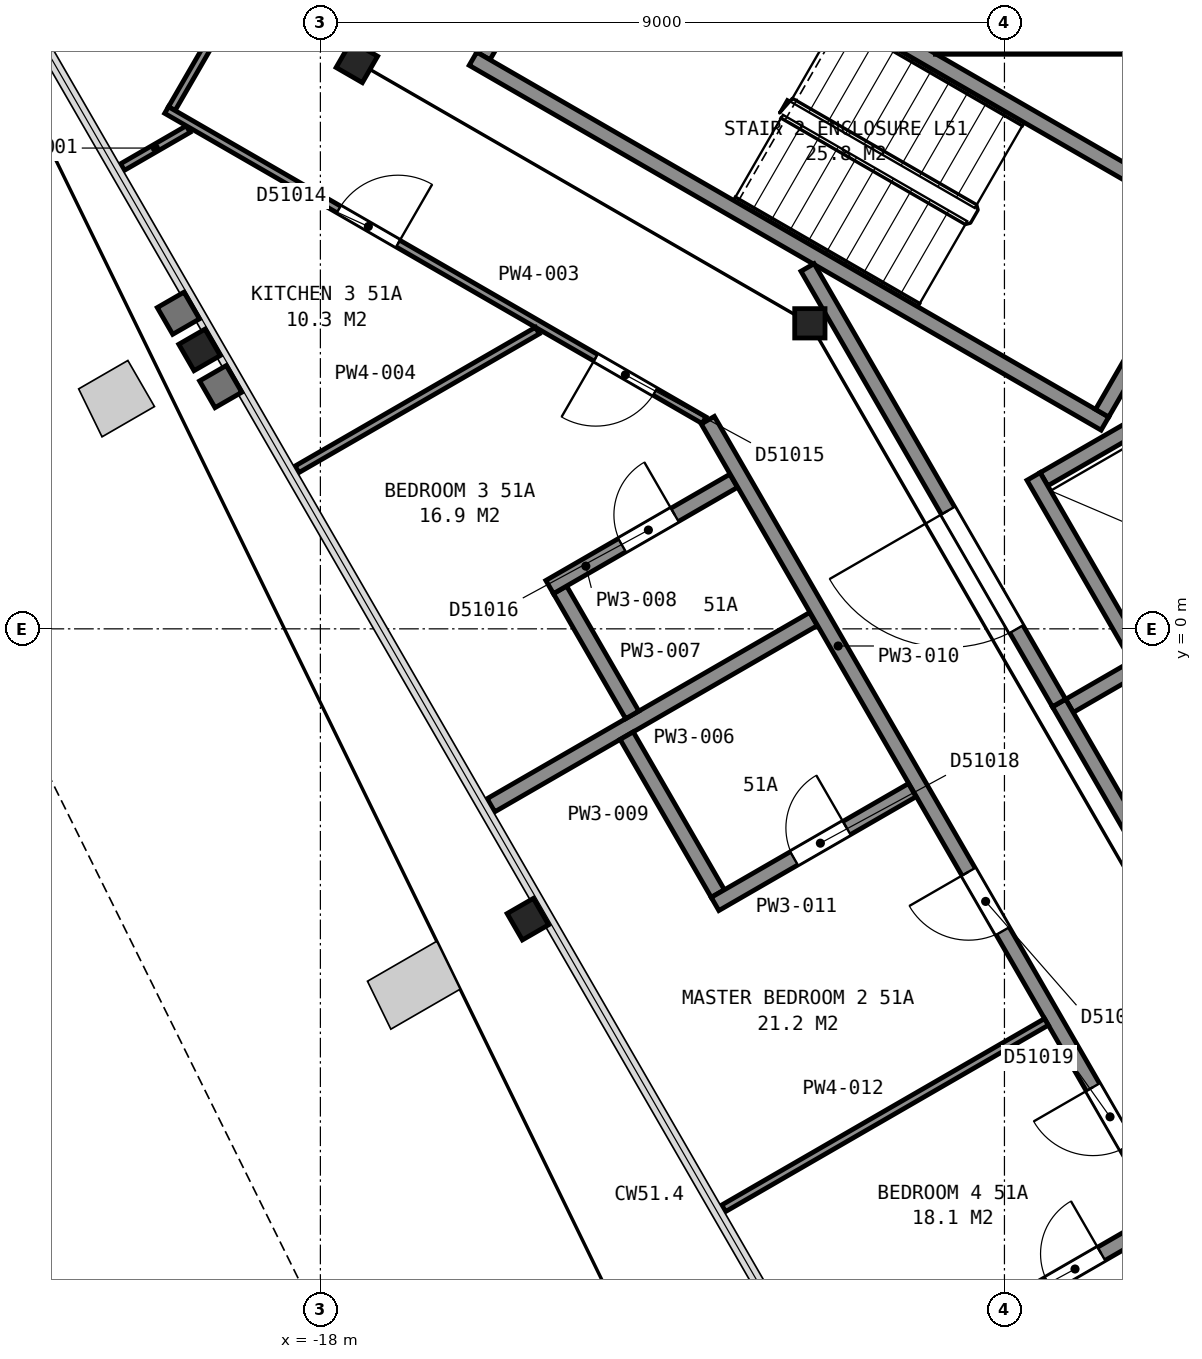
"""IFC4 building model, lengths in metres.
Left out: names, types, materials, properties, quantities, classifications, styles, units other than length and angle.
Written with IfcOpenShell. Run it as: python <this file> out.ifc"""

import sys

from ifc_helpers import new_model, si_unit, direction, frame, frame_2d, origin, origin_2d, place, context, subcontext, project, spatial, rectangle, i_section, extrude, element, fill, save


model = new_model("IFC4")
c1 = context("Model", 3, precision=1e-05, world=origin(), true_north=direction((0.0, 1.0)))
c2 = subcontext(c1, "Body", "Model", "MODEL_VIEW")
j1 = project(units=[si_unit("LENGTHUNIT", "METRE"), si_unit("PLANEANGLEUNIT", "RADIAN")], contexts=[c1])
p1 = place(None, origin())
s1 = spatial("IfcSite", under=j1, at=p1, CompositionType="ELEMENT")
p2 = place(p1, origin())
s2 = spatial("IfcBuilding", under=s1, at=p2, CompositionType="ELEMENT")
p3 = place(p2, frame((0.0, 0.0, 206.4)))
s3 = spatial("IfcBuildingStorey", under=s2, at=p3, CompositionType="ELEMENT", Elevation=206.4)
for number, where, z_axis, x_axis in (
    (1, (-19.59, 3.67, 0.0), (0.0, 0.0, 1.0), (-0.5, 0.866, 0.0)),
    (2, (-15.27, -3.82, 0.0), (0.0, 0.0, 1.0), (-0.5, 0.866, 0.0)),
    (3, (-17.52, 7.46, 0.0), (0.0, 0.0, 1.0), (0.5, 0.866, 0.0)),
):
    element("IfcColumn", number, at=place(p3, frame(where, z_axis=z_axis, x_axis=x_axis)), inside=s3, PredefinedType="COLUMN", context=c2, shape_type="SweptSolid", body=[
        extrude(i_section(OverallWidth=0.401, OverallDepth=0.399, WebThickness=0.025, FlangeThickness=0.04, FilletRadius=0.015, at=origin_2d()), origin(), (0.0, 0.0, 1.0), 3.7),
    ])
p4 = place(p3, frame((-11.56, 4.02, 0.0), z_axis=(0.0, 0.0, 1.0), x_axis=(1.0, 0.0, 0.0)))
e4 = element("IfcColumn", 4, at=p4, inside=s3, PredefinedType="COLUMN", context=c2, shape_type="SweptSolid", body=[
    extrude(i_section(OverallWidth=0.399, OverallDepth=0.386, WebThickness=0.021, FlangeThickness=0.033, FilletRadius=0.015, at=origin_2d()), origin(), (0.0, 0.0, 1.0), 3.7),
])
p5 = place(p3, frame((-14.455, 9.962, 0.0), z_axis=(0.0, 0.0, 1.0), x_axis=(-0.500049511043, -0.865996816683, 0.0)))
e5 = element("IfcWall", 5, at=p5, inside=s3, PredefinedType="PARTITIONING", context=c2, shape_type="SweptSolid", body=[
    extrude(rectangle(XDim=2.8, YDim=0.2, at=frame_2d((1.4, 0.0))), origin(), (0.0, 0.0, 1.0), 3.45),
])
p6 = place(p5, frame((0.85, 0.0, 0.0)))
e6 = element("IfcOpeningElement", 6, at=p6, cuts=e5, PredefinedType="OPENING", context=c2, shape_type="SweptSolid", body=[
    extrude(rectangle(XDim=1.1, YDim=2.1, at=frame_2d((0.55, 1.05))), frame((0.0, 0.11, 0.0), z_axis=(0.0, -1.0, 0.0), x_axis=(1.0, 0.0, 0.0)), (0.0, 0.0, 1.0), 0.22),
])
for number, where, z_axis, x_axis in (
    (7, (-7.678, 2.701, 0.0), (0.0, 0.0, 1.0), (-0.866, 0.5, 0.0)),
    (8, (-6.178, 5.299, 0.0), (0.0, 0.0, 1.0), (-0.866, 0.5, 0.0)),
):
    element("IfcWall", number, at=place(p3, frame(where, z_axis=z_axis, x_axis=x_axis)), inside=s3, PredefinedType="PARTITIONING", context=c2, shape_type="SweptSolid", body=[
        extrude(rectangle(XDim=9.6, YDim=0.2, at=frame_2d((4.8, 0.0))), origin(), (0.0, 0.0, 1.0), 3.45),
    ])
p7 = place(p3, frame((-6.315, 5.262, 0.0), z_axis=(0.0, 0.0, 1.0), x_axis=(-0.500049511043, -0.865996816683, 0.0)))
e9 = element("IfcWall", 9, at=p7, inside=s3, PredefinedType="PARTITIONING", context=c2, shape_type="SweptSolid", body=[
    extrude(rectangle(XDim=2.8, YDim=0.2, at=frame_2d((1.4, 0.0))), origin(), (0.0, 0.0, 1.0), 3.45),
])
p8 = place(p3, frame((-8.145, -1.013, 0.0), z_axis=(0.0, 0.0, 1.0), x_axis=(0.866016494683, 0.500015430699, 0.0)))
e10 = element("IfcWall", 10, at=p8, inside=s3, PredefinedType="PARTITIONING", context=c2, shape_type="SweptSolid", body=[
    extrude(rectangle(XDim=3.15, YDim=0.2, at=frame_2d((1.575, 0.0))), origin(), (0.0, 0.0, 1.0), 3.7),
])
p9 = place(p3, frame((-8.48, 1.969, 0.0), z_axis=(0.0, 0.0, 1.0), x_axis=(0.866000020948, 0.500043961785, 0.0)))
e11 = element("IfcWall", 11, at=p9, inside=s3, PredefinedType="PARTITIONING", context=c2, shape_type="SweptSolid", body=[
    extrude(rectangle(XDim=1.95, YDim=0.2, at=frame_2d((0.975, 0.0))), origin(), (0.0, 0.0, 1.0), 3.7),
])
p10 = place(p3, frame((-7.242, -0.376, 0.0), z_axis=(0.0, 0.0, 1.0), x_axis=(-0.499996545922, 0.866027397988, 0.0)))
e12 = element("IfcWall", 12, at=p10, inside=s3, PredefinedType="PARTITIONING", context=c2, shape_type="SweptSolid", body=[
    extrude(rectangle(XDim=2.75, YDim=0.2, at=frame_2d((1.375, 0.0))), origin(), (0.0, 0.0, 1.0), 3.7),
])
p11 = place(p3, frame((-7.006, -3.185, 0.0), z_axis=(0.0, 0.0, 1.0), x_axis=(-0.499990435942, 0.866030925526, 0.0)))
e13 = element("IfcWall", 13, at=p11, inside=s3, PredefinedType="PARTITIONING", context=c2, shape_type="SweptSolid", body=[
    extrude(rectangle(XDim=2.55, YDim=0.2, at=frame_2d((1.275, 0.0))), origin(), (0.0, 0.0, 1.0), 3.7),
])
p12 = place(p3, frame((-11.591, 4.755, 0.0), z_axis=(0.0, 0.0, 1.0), x_axis=(0.500043977787, -0.866000011708, 0.0)))
e14 = element("IfcWall", 14, at=p12, inside=s3, PredefinedType="PARTITIONING", context=c2, shape_type="SweptSolid", body=[
    extrude(rectangle(XDim=6.617, YDim=0.2, at=frame_2d((3.308, 0.0))), origin(), (0.0, 0.0, 1.0), 3.45),
])
p13 = place(p12, frame((3.695, 0.0, 0.0)))
e15 = element("IfcOpeningElement", 15, at=p13, cuts=e14, PredefinedType="OPENING", context=c2, shape_type="SweptSolid", body=[
    extrude(rectangle(XDim=1.8, YDim=2.1, at=frame_2d((0.9, 1.05))), frame((0.0, 0.11, 0.0), z_axis=(0.0, -1.0, 0.0), x_axis=(1.0, 0.0, 0.0)), (0.0, 0.0, 1.0), 0.22),
])
p14 = place(p3, frame((-9.908, 7.66, 0.0), z_axis=(0.0, 0.0, 1.0), x_axis=(1.0, 0.0, 0.0)))
e16 = element("IfcWall", 16, at=p14, inside=s3, PredefinedType="PARTITIONING", context=c2, shape_type="SweptSolid", body=[
    extrude(rectangle(XDim=3.621, YDim=0.2, at=frame_2d((1.811, 0.0))), origin(), (0.0, 0.0, 1.0), 3.45),
])
p15 = place(p3, frame((-20.604, 6.076, 0.0), z_axis=(0.0, 0.0, 1.0), x_axis=(0.865855657918, 0.500293893279, 0.0)))
e17 = element("IfcWall", 17, at=p15, inside=s3, PredefinedType="PARTITIONING", context=c2, shape_type="SweptSolid", body=[
    extrude(rectangle(XDim=0.999, YDim=0.1, at=frame_2d((0.499, 0.0))), origin(), (0.0, 0.0, 1.0), 2.713),
])
p16 = place(p3, frame((-19.955, 6.844, 0.0), z_axis=(0.0, 0.0, 1.0), x_axis=(0.500415732313, 0.865785247537, 0.0)))
e18 = element("IfcWall", 18, at=p16, inside=s3, PredefinedType="PARTITIONING", context=c2, shape_type="SweptSolid", body=[
    extrude(rectangle(XDim=8.097, YDim=0.1, at=frame_2d((4.049, 0.0))), origin(), (0.0, 0.0, 1.0), 2.713),
])
p17 = place(p16, frame((3.6, 0.0, 0.0)))
e19 = element("IfcOpeningElement", 19, at=p17, cuts=e18, PredefinedType="OPENING", context=c2, shape_type="SweptSolid", body=[
    extrude(rectangle(XDim=0.9, YDim=2.1, at=frame_2d((0.45, 1.05))), frame((0.0, 0.06, 0.0), z_axis=(0.0, -1.0, 0.0), x_axis=(1.0, 0.0, 0.0)), (0.0, 0.0, 1.0), 0.12),
])
p18 = place(p3, frame((-12.952, 2.744, 0.0), z_axis=(0.0, 0.0, 1.0), x_axis=(-0.86608949446, 0.499888975259, 0.0)))
e20 = element("IfcWall", 20, at=p18, inside=s3, PredefinedType="PARTITIONING", context=c2, shape_type="SweptSolid", body=[
    extrude(rectangle(XDim=8.165, YDim=0.1, at=frame_2d((4.083, 0.0))), origin(), (0.0, 0.0, 1.0), 2.713),
])
p19 = place(p18, frame((4.65, 0.0, 0.0)))
e21 = element("IfcOpeningElement", 21, at=p19, cuts=e20, PredefinedType="OPENING", context=c2, shape_type="SweptSolid", body=[
    extrude(rectangle(XDim=0.9, YDim=2.1, at=frame_2d((0.45, 1.05))), frame((0.0, 0.06, 0.0), z_axis=(0.0, -1.0, 0.0), x_axis=(1.0, 0.0, 0.0)), (0.0, 0.0, 1.0), 0.12),
])
p20 = place(p18, frame((0.746, 0.0, 0.0)))
e22 = element("IfcOpeningElement", 22, at=p20, cuts=e20, PredefinedType="OPENING", context=c2, shape_type="SweptSolid", body=[
    extrude(rectangle(XDim=0.9, YDim=2.1, at=frame_2d((0.45, 1.05))), frame((0.0, 0.06, 0.0), z_axis=(0.0, -1.0, 0.0), x_axis=(1.0, 0.0, 0.0)), (0.0, 0.0, 1.0), 0.12),
])
p21 = place(p3, frame((-18.308, 2.099, 0.0), z_axis=(0.0, 0.0, 1.0), x_axis=(0.866054218355, 0.499950088379, 0.0)))
e23 = element("IfcWall", 23, at=p21, inside=s3, PredefinedType="PARTITIONING", context=c2, shape_type="SweptSolid", body=[
    extrude(rectangle(XDim=3.652, YDim=0.1, at=frame_2d((1.826, 0.0))), origin(), (0.0, 0.0, 1.0), 2.713),
])
p22 = place(p3, frame((-15.756, -2.321, 0.0), z_axis=(0.0, 0.0, 1.0), x_axis=(0.866042025588, 0.499971209087, 0.0)))
e24 = element("IfcWall", 24, at=p22, inside=s3, PredefinedType="PARTITIONING", context=c2, shape_type="SweptSolid", body=[
    extrude(rectangle(XDim=4.899, YDim=0.2, at=frame_2d((2.45, 0.0))), origin(), (0.0, 0.0, 1.0), 2.713),
])
p23 = place(p3, frame((-14.847, 0.513, 0.0), z_axis=(0.0, 0.0, 1.0), x_axis=(0.499911523785, -0.866076479525, 0.0)))
e25 = element("IfcWall", 25, at=p23, inside=s3, PredefinedType="PARTITIONING", context=c2, shape_type="SweptSolid", body=[
    extrude(rectangle(XDim=1.9, YDim=0.2, at=frame_2d((0.95, 0.0))), origin(), (0.0, 0.0, 1.0), 2.713),
])
p24 = place(p3, frame((-12.563, 1.948, 0.0), z_axis=(0.0, 0.0, 1.0), x_axis=(-0.866041588165, -0.499971966783, 0.0)))
e26 = element("IfcWall", 26, at=p24, inside=s3, PredefinedType="PARTITIONING", context=c2, shape_type="SweptSolid", body=[
    extrude(rectangle(XDim=2.795, YDim=0.2, at=frame_2d((1.397, 0.0))), origin(), (0.0, 0.0, 1.0), 2.713),
])
p25 = place(p24, frame((0.895, 0.0, 0.0)))
e27 = element("IfcOpeningElement", 27, at=p25, cuts=e26, PredefinedType="OPENING", context=c2, shape_type="SweptSolid", body=[
    extrude(rectangle(XDim=0.8, YDim=2.1, at=frame_2d((0.4, 1.05))), frame((0.0, 0.11, 0.0), z_axis=(0.0, -1.0, 0.0), x_axis=(1.0, 0.0, 0.0)), (0.0, 0.0, 1.0), 0.22),
])
p26 = place(p3, frame((-13.97, -1.406, 0.0), z_axis=(0.0, 0.0, 1.0), x_axis=(0.499784123135, -0.866150004481, 0.0)))
e28 = element("IfcWall", 28, at=p26, inside=s3, PredefinedType="PARTITIONING", context=c2, shape_type="SweptSolid", body=[
    extrude(rectangle(XDim=2.399, YDim=0.2, at=frame_2d((1.199, 0.0))), origin(), (0.0, 0.0, 1.0), 2.713),
])
p27 = place(p3, frame((-4.075, -12.545, 0.0), z_axis=(0.0, 0.0, 1.0), x_axis=(-0.499999743747, 0.866025551732, 0.0)))
e29 = element("IfcWall", 29, at=p27, inside=s3, PredefinedType="PARTITIONING", context=c2, shape_type="SweptSolid", body=[
    extrude(rectangle(XDim=17.656, YDim=0.2, at=frame_2d((8.828, 0.0))), origin(), (0.0, 0.0, 1.0), 2.713),
])
p28 = place(p27, frame((9.895, 0.0, 0.0)))
e30 = element("IfcOpeningElement", 30, at=p28, cuts=e29, PredefinedType="OPENING", context=c2, shape_type="SweptSolid", body=[
    extrude(rectangle(XDim=0.9, YDim=2.1, at=frame_2d((0.45, 1.05))), frame((0.0, 0.11, 0.0), z_axis=(0.0, -1.0, 0.0), x_axis=(1.0, 0.0, 0.0)), (0.0, 0.0, 1.0), 0.22),
])
p29 = place(p27, frame((6.622, 0.0, 0.0)))
e31 = element("IfcOpeningElement", 31, at=p29, cuts=e29, PredefinedType="OPENING", context=c2, shape_type="SweptSolid", body=[
    extrude(rectangle(XDim=0.9, YDim=2.1, at=frame_2d((0.45, 1.05))), frame((0.0, 0.11, 0.0), z_axis=(0.0, -1.0, 0.0), x_axis=(1.0, 0.0, 0.0)), (0.0, 0.0, 1.0), 0.22),
])
p30 = place(p27, frame((0.268, 0.0, 0.0)))
e32 = element("IfcOpeningElement", 32, at=p30, cuts=e29, PredefinedType="OPENING", context=c2, shape_type="SweptSolid", body=[
    extrude(rectangle(XDim=0.9, YDim=2.1, at=frame_2d((0.45, 1.05))), frame((0.0, 0.11, 0.0), z_axis=(0.0, -1.0, 0.0), x_axis=(1.0, 0.0, 0.0)), (0.0, 0.0, 1.0), 0.22),
])
p31 = place(p3, frame((-12.808, -3.62, 0.0), z_axis=(0.0, 0.0, 1.0), x_axis=(0.866134024916, 0.499811815469, 0.0)))
e33 = element("IfcWall", 33, at=p31, inside=s3, PredefinedType="PARTITIONING", context=c2, shape_type="SweptSolid", body=[
    extrude(rectangle(XDim=2.996, YDim=0.2, at=frame_2d((1.498, 0.0))), origin(), (0.0, 0.0, 1.0), 2.713),
])
p32 = place(p31, frame((1.2, 0.0, 0.0)))
e34 = element("IfcOpeningElement", 34, at=p32, cuts=e33, PredefinedType="OPENING", context=c2, shape_type="SweptSolid", body=[
    extrude(rectangle(XDim=0.8, YDim=2.1, at=frame_2d((0.4, 1.05))), frame((0.0, 0.11, 0.0), z_axis=(0.0, -1.0, 0.0), x_axis=(1.0, 0.0, 0.0)), (0.0, 0.0, 1.0), 0.22),
])
p33 = place(p3, frame((-12.694, -7.624, 0.0), z_axis=(0.0, 0.0, 1.0), x_axis=(0.865991567799, 0.500058601068, 0.0)))
e35 = element("IfcWall", 35, at=p33, inside=s3, PredefinedType="PARTITIONING", context=c2, shape_type="SweptSolid", body=[
    extrude(rectangle(XDim=4.904, YDim=0.1, at=frame_2d((2.452, 0.0))), origin(), (0.0, 0.0, 1.0), 2.713),
])
p34 = place(p3, frame((-6.95, -7.775, 0.0), z_axis=(0.0, 0.0, 1.0), x_axis=(-0.866003766563, -0.500037474894, 0.0)))
e36 = element("IfcWall", 36, at=p34, inside=s3, PredefinedType="PARTITIONING", context=c2, shape_type="SweptSolid", body=[
    extrude(rectangle(XDim=2.795, YDim=0.2, at=frame_2d((1.397, 0.0))), origin(), (0.0, 0.0, 1.0), 2.713),
])
p35 = place(p34, frame((0.895, 0.0, 0.0)))
e37 = element("IfcOpeningElement", 37, at=p35, cuts=e36, PredefinedType="OPENING", context=c2, shape_type="SweptSolid", body=[
    extrude(rectangle(XDim=0.8, YDim=2.1, at=frame_2d((0.4, 1.05))), frame((0.0, 0.11, 0.0), z_axis=(0.0, -1.0, 0.0), x_axis=(1.0, 0.0, 0.0)), (0.0, 0.0, 1.0), 0.22),
])
p36 = place(p13, origin())
e38 = element("IfcDoor", 38, at=p36, inside=s3, OperationType="DOUBLE_DOOR_SINGLE_SWING", PredefinedType="DOOR", context=c2, shape_type="SweptSolid", body=[
    extrude(rectangle(XDim=1.8, YDim=2.1, at=frame_2d((0.9, 1.05))), frame((0.0, 0.025, 0.0), z_axis=(0.0, -1.0, 0.0), x_axis=(1.0, 0.0, 0.0)), (0.0, 0.0, 1.0), 0.05),
])
fill(e15, e38)
p37 = place(p19, origin())
e39 = element("IfcDoor", 39, at=p37, inside=s3, OperationType="SINGLE_SWING_LEFT", PredefinedType="DOOR", context=c2, shape_type="SweptSolid", body=[
    extrude(rectangle(XDim=0.9, YDim=2.1, at=frame_2d((0.45, 1.05))), frame((0.0, 0.025, 0.0), z_axis=(0.0, -1.0, 0.0), x_axis=(1.0, 0.0, 0.0)), (0.0, 0.0, 1.0), 0.05),
])
fill(e21, e39)
p38 = place(p20, origin())
e40 = element("IfcDoor", 40, at=p38, inside=s3, OperationType="SINGLE_SWING_RIGHT", PredefinedType="DOOR", context=c2, shape_type="SweptSolid", body=[
    extrude(rectangle(XDim=0.9, YDim=2.1, at=frame_2d((0.45, 1.05))), frame((0.0, 0.025, 0.0), z_axis=(0.0, -1.0, 0.0), x_axis=(1.0, 0.0, 0.0)), (0.0, 0.0, 1.0), 0.05),
])
fill(e22, e40)
p39 = place(p25, origin())
e41 = element("IfcDoor", 41, at=p39, inside=s3, OperationType="SINGLE_SWING_LEFT", PredefinedType="DOOR", context=c2, shape_type="SweptSolid", body=[
    extrude(rectangle(XDim=0.8, YDim=2.1, at=frame_2d((0.4, 1.05))), frame((0.0, 0.025, 0.0), z_axis=(0.0, -1.0, 0.0), x_axis=(1.0, 0.0, 0.0)), (0.0, 0.0, 1.0), 0.05),
])
fill(e27, e41)
p40 = place(p28, origin())
e42 = element("IfcDoor", 42, at=p40, inside=s3, OperationType="SINGLE_SWING_RIGHT", PredefinedType="DOOR", context=c2, shape_type="SweptSolid", body=[
    extrude(rectangle(XDim=0.9, YDim=2.1, at=frame_2d((0.45, 1.05))), frame((0.0, 0.025, 0.0), z_axis=(0.0, -1.0, 0.0), x_axis=(1.0, 0.0, 0.0)), (0.0, 0.0, 1.0), 0.05),
])
fill(e30, e42)
p41 = place(p29, origin())
e43 = element("IfcDoor", 43, at=p41, inside=s3, OperationType="SINGLE_SWING_RIGHT", PredefinedType="DOOR", context=c2, shape_type="SweptSolid", body=[
    extrude(rectangle(XDim=0.9, YDim=2.1, at=frame_2d((0.45, 1.05))), frame((0.0, 0.025, 0.0), z_axis=(0.0, -1.0, 0.0), x_axis=(1.0, 0.0, 0.0)), (0.0, 0.0, 1.0), 0.05),
])
fill(e31, e43)
p42 = place(p32, origin())
e44 = element("IfcDoor", 44, at=p42, inside=s3, OperationType="SINGLE_SWING_RIGHT", PredefinedType="DOOR", context=c2, shape_type="SweptSolid", body=[
    extrude(rectangle(XDim=0.8, YDim=2.1, at=frame_2d((0.4, 1.05))), frame((0.0, 0.025, 0.0), z_axis=(0.0, -1.0, 0.0), x_axis=(1.0, 0.0, 0.0)), (0.0, 0.0, 1.0), 0.05),
])
fill(e34, e44)
p43 = place(p35, origin())
e45 = element("IfcDoor", 45, at=p43, inside=s3, OperationType="SINGLE_SWING_LEFT", PredefinedType="DOOR", context=c2, shape_type="SweptSolid", body=[
    extrude(rectangle(XDim=0.8, YDim=2.1, at=frame_2d((0.4, 1.05))), frame((0.0, 0.025, 0.0), z_axis=(0.0, -1.0, 0.0), x_axis=(1.0, 0.0, 0.0)), (0.0, 0.0, 1.0), 0.05),
])
fill(e37, e45)
save(model, sys.argv[1])
